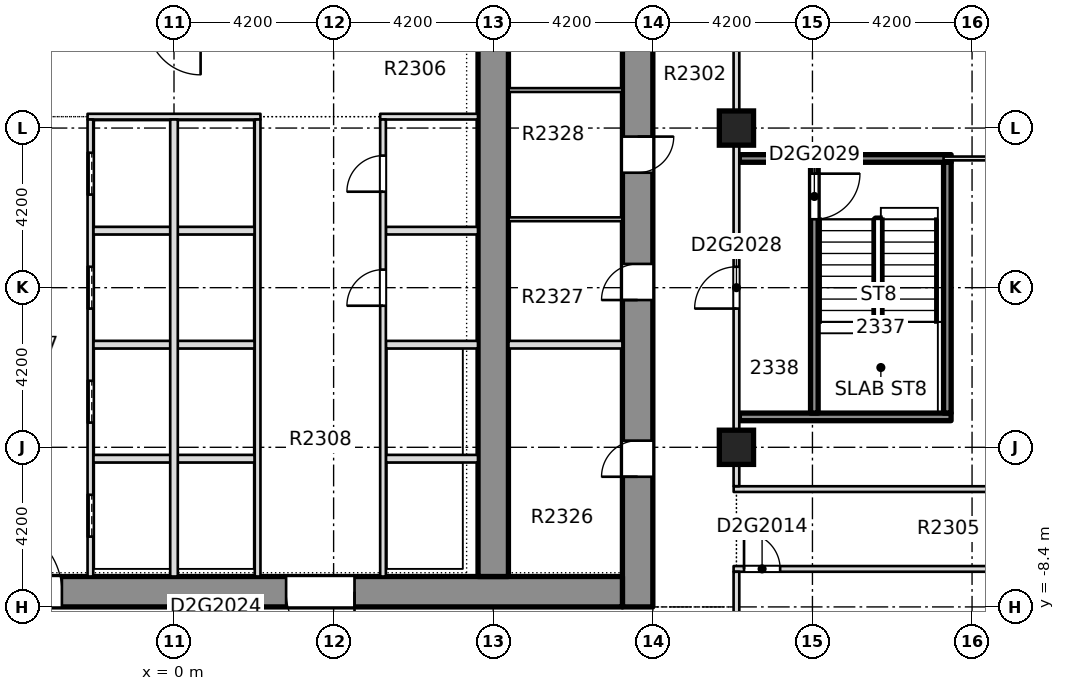
"""IFC4 building model, lengths in metres.
Left out: names, types, materials, properties, quantities, classifications, styles, units other than length and angle.
Written with IfcOpenShell. Run it as: python <this file> out.ifc"""

import sys

from ifc_helpers import new_model, si_unit, direction, frame, frame_2d, origin, origin_2d, place, context, subcontext, project, spatial, rectangle, extrude, element, fill, save


model = new_model("IFC4")
c1 = context("Model", 3, precision=1e-05, world=origin(), true_north=direction((0.0, 1.0)))
c2 = subcontext(c1, "Body", "Model", "MODEL_VIEW")
j1 = project(units=[si_unit("LENGTHUNIT", "METRE"), si_unit("PLANEANGLEUNIT", "RADIAN")], contexts=[c1])
p1 = place(None, origin())
s1 = spatial("IfcSite", under=j1, at=p1, CompositionType="ELEMENT")
p2 = place(p1, origin())
s2 = spatial("IfcBuilding", under=s1, at=p2, CompositionType="ELEMENT")
p3 = place(p2, frame((0.0, 0.0, 94.2)))
s3 = spatial("IfcBuildingStorey", under=s2, at=p3, CompositionType="ELEMENT", Elevation=94.2)
p4 = place(p3, frame((12.2, -8.4, -0.32), z_axis=(0.0, 0.0, 1.0), x_axis=(0.0, 1.0, 0.0)))
e1 = element("IfcWall", 1, at=p4, inside=s3, PredefinedType="SHEAR", context=c2, shape_type="SweptSolid", body=[
    extrude(rectangle(XDim=30.15, YDim=0.8, at=frame_2d((15.075, 0.0))), origin(), (0.0, 0.0, 1.0), 3.45),
])
p5 = place(p4, frame((3.425, 0.0, 0.32)))
e2 = element("IfcOpeningElement", 2, at=p5, cuts=e1, PredefinedType="OPENING", context=c2, shape_type="SweptSolid", body=[
    extrude(rectangle(XDim=0.95, YDim=2.1, at=frame_2d((0.475, 1.05))), frame((0.0, 0.41, 0.0), z_axis=(0.0, -1.0, 0.0), x_axis=(1.0, 0.0, 0.0)), (0.0, 0.0, 1.0), 0.82),
])
p6 = place(p4, frame((8.075, 0.0, 0.32)))
e3 = element("IfcOpeningElement", 3, at=p6, cuts=e1, PredefinedType="OPENING", context=c2, shape_type="SweptSolid", body=[
    extrude(rectangle(XDim=0.95, YDim=2.1, at=frame_2d((0.475, 1.05))), frame((0.0, 0.41, 0.0), z_axis=(0.0, -1.0, 0.0), x_axis=(1.0, 0.0, 0.0)), (0.0, 0.0, 1.0), 0.82),
])
p7 = place(p4, frame((11.425, 0.0, 0.32)))
e4 = element("IfcOpeningElement", 4, at=p7, cuts=e1, PredefinedType="OPENING", context=c2, shape_type="SweptSolid", body=[
    extrude(rectangle(XDim=0.95, YDim=2.1, at=frame_2d((0.475, 1.05))), frame((0.0, 0.41, 0.0), z_axis=(0.0, -1.0, 0.0), x_axis=(1.0, 0.0, 0.0)), (0.0, 0.0, 1.0), 0.82),
])
p8 = place(p4, frame((15.625, 0.0, 0.32)))
e5 = element("IfcOpeningElement", 5, at=p8, cuts=e1, PredefinedType="OPENING", context=c2, shape_type="SweptSolid", body=[
    extrude(rectangle(XDim=0.95, YDim=2.1, at=frame_2d((0.475, 1.05))), frame((0.0, 0.41, 0.0), z_axis=(0.0, -1.0, 0.0), x_axis=(1.0, 0.0, 0.0)), (0.0, 0.0, 1.0), 0.82),
])
p9 = place(p4, frame((22.725, 0.0, 0.32)))
e6 = element("IfcOpeningElement", 6, at=p9, cuts=e1, PredefinedType="OPENING", context=c2, shape_type="SweptSolid", body=[
    extrude(rectangle(XDim=0.95, YDim=2.1, at=frame_2d((0.475, 1.05))), frame((0.0, 0.41, 0.0), z_axis=(0.0, -1.0, 0.0), x_axis=(1.0, 0.0, 0.0)), (0.0, 0.0, 1.0), 0.82),
])
p10 = place(p4, frame((26.75, 0.0, 0.32)))
e7 = element("IfcOpeningElement", 7, at=p10, cuts=e1, PredefinedType="OPENING", context=c2, shape_type="SweptSolid", body=[
    extrude(rectangle(XDim=0.95, YDim=2.1, at=frame_2d((0.475, 1.05))), frame((0.0, 0.41, 0.0), z_axis=(0.0, -1.0, 0.0), x_axis=(1.0, 0.0, 0.0)), (0.0, 0.0, 1.0), 0.82),
])
p11 = place(p4, frame((19.3, 0.0, 0.32)))
e8 = element("IfcOpeningElement", 8, at=p11, cuts=e1, PredefinedType="OPENING", context=c2, shape_type="SweptSolid", body=[
    extrude(rectangle(XDim=1.2, YDim=2.1, at=frame_2d((0.6, 1.05))), frame((0.0, 0.41, 0.0), z_axis=(0.0, -1.0, 0.0), x_axis=(1.0, 0.0, 0.0)), (0.0, 0.0, 1.0), 0.82),
])
p12 = place(p3, frame((-11.8, -8.0, -0.32), z_axis=(0.0, 0.0, 1.0), x_axis=(1.0, 0.0, 0.0)))
e9 = element("IfcWall", 9, at=p12, inside=s3, PredefinedType="SHEAR", context=c2, shape_type="SweptSolid", body=[
    extrude(rectangle(XDim=23.6, YDim=0.8, at=frame_2d((11.8, 0.0))), origin(), (0.0, 0.0, 1.0), 3.45),
])
p13 = place(p12, frame((7.05, 0.0, 0.32)))
e10 = element("IfcOpeningElement", 10, at=p13, cuts=e9, PredefinedType="OPENING", context=c2, shape_type="SweptSolid", body=[
    extrude(rectangle(XDim=1.8, YDim=2.1, at=frame_2d((0.9, 1.05))), frame((0.0, 0.41, 0.0), z_axis=(0.0, -1.0, 0.0), x_axis=(1.0, 0.0, 0.0)), (0.0, 0.0, 1.0), 0.82),
])
p14 = place(p12, frame((14.75, 0.0, 0.32)))
e11 = element("IfcOpeningElement", 11, at=p14, cuts=e9, PredefinedType="OPENING", context=c2, shape_type="SweptSolid", body=[
    extrude(rectangle(XDim=1.8, YDim=2.1, at=frame_2d((0.9, 1.05))), frame((0.0, 0.41, 0.0), z_axis=(0.0, -1.0, 0.0), x_axis=(1.0, 0.0, 0.0)), (0.0, 0.0, 1.0), 0.82),
])
p15 = place(p3, frame((8.4, -7.6, -0.32), z_axis=(0.0, 0.0, 1.0), x_axis=(0.0, 1.0, 0.0)))
e12 = element("IfcWall", 12, at=p15, inside=s3, PredefinedType="SHEAR", context=c2, shape_type="SweptSolid", body=[
    extrude(rectangle(XDim=28.55, YDim=0.8, at=frame_2d((14.275, 0.0))), origin(), (0.0, 0.0, 1.0), 3.45),
])
p16 = place(p15, frame((18.5, 0.0, 0.32)))
e13 = element("IfcOpeningElement", 13, at=p16, cuts=e12, PredefinedType="OPENING", context=c2, shape_type="SweptSolid", body=[
    extrude(rectangle(XDim=1.2, YDim=2.1, at=frame_2d((0.6, 1.05))), frame((0.0, 0.41, 0.0), z_axis=(0.0, -1.0, 0.0), x_axis=(1.0, 0.0, 0.0)), (0.0, 0.0, 1.0), 0.82),
])
for number, where, z_axis, x_axis in (
    (14, (14.8, -4.2, -0.32), (0.0, 0.0, 1.0), (1.0, 0.0, 0.0)),
    (15, (14.8, 4.2, -0.32), (0.0, 0.0, 1.0), (1.0, 0.0, 0.0)),
):
    element("IfcColumn", number, at=place(p3, frame(where, z_axis=z_axis, x_axis=x_axis)), inside=s3, PredefinedType="COLUMN", context=c2, shape_type="SweptSolid", body=[
        extrude(rectangle(XDim=0.9, YDim=0.9, at=origin_2d()), origin(), (0.0, 0.0, 1.0), 3.45),
    ])
p17 = place(p3, frame((14.725, -7.4, 0.0), z_axis=(0.0, 0.0, 1.0), x_axis=(1.0, 0.0, 0.0)))
e16 = element("IfcWall", 16, at=p17, inside=s3, PredefinedType="PARTITIONING", context=c2, shape_type="SweptSolid", body=[
    extrude(rectangle(XDim=11.025, YDim=0.15, at=frame_2d((5.512, 0.0))), origin(), (0.0, 0.0, 1.0), 3.13),
])
p18 = place(p17, frame((0.275, 0.0, 0.0)))
e17 = element("IfcOpeningElement", 17, at=p18, cuts=e16, PredefinedType="OPENING", context=c2, shape_type="SweptSolid", body=[
    extrude(rectangle(XDim=0.95, YDim=2.1, at=frame_2d((0.475, 1.05))), frame((0.0, 0.085, 0.0), z_axis=(0.0, -1.0, 0.0), x_axis=(1.0, 0.0, 0.0)), (0.0, 0.0, 1.0), 0.17),
])
p19 = place(p3, frame((14.727, -5.3, 0.0), z_axis=(0.0, 0.0, 1.0), x_axis=(1.0, 0.0, 0.0)))
e18 = element("IfcWall", 18, at=p19, inside=s3, PredefinedType="PARTITIONING", context=c2, shape_type="SweptSolid", body=[
    extrude(rectangle(XDim=11.023, YDim=0.15, at=frame_2d((5.511, 0.0))), origin(), (0.0, 0.0, 1.0), 3.13),
])
p20 = place(p3, frame((14.877, -3.4, 0.0), z_axis=(0.0, 0.0, 1.0), x_axis=(1.0, 0.0, 0.0)))
e19 = element("IfcWall", 19, at=p20, inside=s3, PredefinedType="SOLIDWALL", context=c2, shape_type="SweptSolid", body=[
    extrude(rectangle(XDim=5.571, YDim=0.2, at=frame_2d((2.786, 0.0))), origin(), (0.0, 0.0, 1.0), 3.13),
])
p21 = place(p3, frame((14.875, 3.4, 0.0), z_axis=(0.0, 0.0, 1.0), x_axis=(1.0, 0.0, 0.0)))
e20 = element("IfcWall", 20, at=p21, inside=s3, PredefinedType="SOLIDWALL", context=c2, shape_type="SweptSolid", body=[
    extrude(rectangle(XDim=5.575, YDim=0.2, at=frame_2d((2.788, 0.0))), origin(), (0.0, 0.0, 1.0), 3.13),
])
p22 = place(p3, frame((20.25, 3.4, 0.0), z_axis=(0.0, 0.0, 1.0), x_axis=(1.0, 0.0, 0.0)))
e21 = element("IfcWall", 21, at=p22, inside=s3, PredefinedType="PARTITIONING", context=c2, shape_type="SweptSolid", body=[
    extrude(rectangle(XDim=5.5, YDim=0.1, at=frame_2d((2.75, 0.0))), origin(), (0.0, 0.0, 1.0), 3.13),
])
p23 = place(p22, frame((2.425, 0.0, 0.0)))
e22 = element("IfcOpeningElement", 22, at=p23, cuts=e21, PredefinedType="OPENING", context=c2, shape_type="SweptSolid", body=[
    extrude(rectangle(XDim=0.95, YDim=2.1, at=frame_2d((0.475, 1.05))), frame((0.0, 0.06, 0.0), z_axis=(0.0, -1.0, 0.0), x_axis=(1.0, 0.0, 0.0)), (0.0, 0.0, 1.0), 0.12),
])
p24 = place(p3, frame((14.8, -10.6, 0.0), z_axis=(0.0, 0.0, 1.0), x_axis=(0.0, 1.0, 0.0)))
e23 = element("IfcWall", 23, at=p24, inside=s3, PredefinedType="PARTITIONING", context=c2, shape_type="SweptSolid", body=[
    extrude(rectangle(XDim=3.125, YDim=0.15, at=frame_2d((1.562, 0.0))), origin(), (0.0, 0.0, 1.0), 3.13),
])
p25 = place(p3, frame((14.8, -5.223, 0.0), z_axis=(0.0, 0.0, 1.0), x_axis=(0.0, 1.0, 0.0)))
e24 = element("IfcWall", 24, at=p25, inside=s3, PredefinedType="PARTITIONING", context=c2, shape_type="SweptSolid", body=[
    extrude(rectangle(XDim=19.873, YDim=0.15, at=frame_2d((9.937, 0.0))), origin(), (0.0, 0.0, 1.0), 3.13),
])
p26 = place(p25, frame((12.723, 0.0, 0.0)))
e25 = element("IfcOpeningElement", 25, at=p26, cuts=e24, PredefinedType="OPENING", context=c2, shape_type="SweptSolid", body=[
    extrude(rectangle(XDim=1.0, YDim=2.1, at=frame_2d((0.5, 1.05))), frame((0.0, 0.085, 0.0), z_axis=(0.0, -1.0, 0.0), x_axis=(1.0, 0.0, 0.0)), (0.0, 0.0, 1.0), 0.17),
])
p27 = place(p25, frame((4.673, 0.0, 0.0)))
e26 = element("IfcOpeningElement", 26, at=p27, cuts=e24, PredefinedType="OPENING", context=c2, shape_type="SweptSolid", body=[
    extrude(rectangle(XDim=1.1, YDim=2.1, at=frame_2d((0.55, 1.05))), frame((0.0, 0.085, 0.0), z_axis=(0.0, -1.0, 0.0), x_axis=(1.0, 0.0, 0.0)), (0.0, 0.0, 1.0), 0.17),
])
p28 = place(p3, frame((16.85, -3.3, 0.0), z_axis=(0.0, 0.0, 1.0), x_axis=(0.0, 1.0, 0.0)))
e27 = element("IfcWall", 27, at=p28, inside=s3, PredefinedType="SOLIDWALL", context=c2, shape_type="SweptSolid", body=[
    extrude(rectangle(XDim=6.6, YDim=0.2, at=frame_2d((3.3, 0.0))), origin(), (0.0, 0.0, 1.0), 3.13),
])
p29 = place(p28, frame((5.1, 0.0, 0.0)))
e28 = element("IfcOpeningElement", 28, at=p29, cuts=e27, PredefinedType="OPENING", context=c2, shape_type="SweptSolid", body=[
    extrude(rectangle(XDim=1.2, YDim=2.1, at=frame_2d((0.6, 1.05))), frame((0.0, 0.11, 0.0), z_axis=(0.0, -1.0, 0.0), x_axis=(1.0, 0.0, 0.0)), (0.0, 0.0, 1.0), 0.22),
])
p30 = place(p3, frame((-2.125, -4.5, 0.0), z_axis=(0.0, 0.0, 1.0), x_axis=(1.0, 0.0, 0.0)))
e29 = element("IfcWall", 29, at=p30, inside=s3, PredefinedType="PARTITIONING", context=c2, shape_type="SweptSolid", body=[
    extrude(rectangle(XDim=4.25, YDim=0.2, at=frame_2d((2.125, 0.0))), origin(), (0.0, 0.0, 1.0), 3.13),
])
p31 = place(p3, frame((5.575, -4.5, 0.0), z_axis=(0.0, 0.0, 1.0), x_axis=(1.0, 0.0, 0.0)))
e30 = element("IfcWall", 30, at=p31, inside=s3, PredefinedType="PARTITIONING", context=c2, shape_type="SweptSolid", body=[
    extrude(rectangle(XDim=2.424, YDim=0.2, at=frame_2d((1.212, 0.0))), origin(), (0.0, 0.0, 1.0), 3.13),
])
p32 = place(p3, frame((-2.125, -1.5, 0.0), z_axis=(0.0, 0.0, 1.0), x_axis=(1.0, 0.0, 0.0)))
e31 = element("IfcWall", 31, at=p32, inside=s3, PredefinedType="PARTITIONING", context=c2, shape_type="SweptSolid", body=[
    extrude(rectangle(XDim=4.25, YDim=0.2, at=frame_2d((2.125, 0.0))), origin(), (0.0, 0.0, 1.0), 3.13),
])
p33 = place(p3, frame((5.575, -1.5, 0.0), z_axis=(0.0, 0.0, 1.0), x_axis=(1.0, 0.0, 0.0)))
e32 = element("IfcWall", 32, at=p33, inside=s3, PredefinedType="PARTITIONING", context=c2, shape_type="SweptSolid", body=[
    extrude(rectangle(XDim=2.424, YDim=0.2, at=frame_2d((1.212, 0.0))), origin(), (0.0, 0.0, 1.0), 3.13),
])
p34 = place(p3, frame((-2.125, 1.5, 0.0), z_axis=(0.0, 0.0, 1.0), x_axis=(1.0, 0.0, 0.0)))
e33 = element("IfcWall", 33, at=p34, inside=s3, PredefinedType="PARTITIONING", context=c2, shape_type="SweptSolid", body=[
    extrude(rectangle(XDim=4.25, YDim=0.2, at=frame_2d((2.125, 0.0))), origin(), (0.0, 0.0, 1.0), 3.13),
])
p35 = place(p3, frame((5.575, 1.5, 0.0), z_axis=(0.0, 0.0, 1.0), x_axis=(1.0, 0.0, 0.0)))
e34 = element("IfcWall", 34, at=p35, inside=s3, PredefinedType="PARTITIONING", context=c2, shape_type="SweptSolid", body=[
    extrude(rectangle(XDim=2.424, YDim=0.2, at=frame_2d((1.212, 0.0))), origin(), (0.0, 0.0, 1.0), 3.13),
])
p36 = place(p3, frame((-2.275, 4.5, 0.0), z_axis=(0.0, 0.0, 1.0), x_axis=(1.0, 0.0, 0.0)))
e35 = element("IfcWall", 35, at=p36, inside=s3, PredefinedType="PARTITIONING", context=c2, shape_type="SweptSolid", body=[
    extrude(rectangle(XDim=4.55, YDim=0.15, at=frame_2d((2.275, 0.0))), origin(), (0.0, 0.0, 1.0), 3.13),
])
p37 = place(p3, frame((5.425, 4.5, 0.0), z_axis=(0.0, 0.0, 1.0), x_axis=(1.0, 0.0, 0.0)))
e36 = element("IfcWall", 36, at=p37, inside=s3, PredefinedType="PARTITIONING", context=c2, shape_type="SweptSolid", body=[
    extrude(rectangle(XDim=2.574, YDim=0.15, at=frame_2d((1.287, 0.0))), origin(), (0.0, 0.0, 1.0), 3.13),
])
p38 = place(p3, frame((-2.2, -7.599, 0.0), z_axis=(0.0, 0.0, 1.0), x_axis=(0.0, 1.0, 0.0)))
e37 = element("IfcWall", 37, at=p38, inside=s3, PredefinedType="PARTITIONING", context=c2, shape_type="SweptSolid", body=[
    extrude(rectangle(XDim=12.024, YDim=0.15, at=frame_2d((6.012, 0.0))), origin(), (0.0, 0.0, 1.0), 3.13),
])
p39 = place(p38, frame((1.049, 0.0, 0.0)))
e38 = element("IfcOpeningElement", 38, at=p39, cuts=e37, PredefinedType="OPENING", context=c2, shape_type="SweptSolid", body=[
    extrude(rectangle(XDim=1.1, YDim=2.1, at=frame_2d((0.55, 1.05))), frame((0.0, 0.085, 0.0), z_axis=(0.0, -1.0, 0.0), x_axis=(1.0, 0.0, 0.0)), (0.0, 0.0, 1.0), 0.17),
])
p40 = place(p38, frame((4.049, 0.0, 0.0)))
e39 = element("IfcOpeningElement", 39, at=p40, cuts=e37, PredefinedType="OPENING", context=c2, shape_type="SweptSolid", body=[
    extrude(rectangle(XDim=1.1, YDim=2.1, at=frame_2d((0.55, 1.05))), frame((0.0, 0.085, 0.0), z_axis=(0.0, -1.0, 0.0), x_axis=(1.0, 0.0, 0.0)), (0.0, 0.0, 1.0), 0.17),
])
p41 = place(p38, frame((7.049, 0.0, 0.0)))
e40 = element("IfcOpeningElement", 40, at=p41, cuts=e37, PredefinedType="OPENING", context=c2, shape_type="SweptSolid", body=[
    extrude(rectangle(XDim=1.1, YDim=2.1, at=frame_2d((0.55, 1.05))), frame((0.0, 0.085, 0.0), z_axis=(0.0, -1.0, 0.0), x_axis=(1.0, 0.0, 0.0)), (0.0, 0.0, 1.0), 0.17),
])
p42 = place(p38, frame((10.049, 0.0, 0.0)))
e41 = element("IfcOpeningElement", 41, at=p42, cuts=e37, PredefinedType="OPENING", context=c2, shape_type="SweptSolid", body=[
    extrude(rectangle(XDim=1.1, YDim=2.1, at=frame_2d((0.55, 1.05))), frame((0.0, 0.085, 0.0), z_axis=(0.0, -1.0, 0.0), x_axis=(1.0, 0.0, 0.0)), (0.0, 0.0, 1.0), 0.17),
])
p43 = place(p3, frame((0.0, -7.599, 0.0), z_axis=(0.0, 0.0, 1.0), x_axis=(0.0, 1.0, 0.0)))
e42 = element("IfcWall", 42, at=p43, inside=s3, PredefinedType="PARTITIONING", context=c2, shape_type="SweptSolid", body=[
    extrude(rectangle(XDim=12.024, YDim=0.2, at=frame_2d((6.012, 0.0))), origin(), (0.0, 0.0, 1.0), 3.13),
])
p44 = place(p3, frame((2.2, -7.599, 0.0), z_axis=(0.0, 0.0, 1.0), x_axis=(0.0, 1.0, 0.0)))
e43 = element("IfcWall", 43, at=p44, inside=s3, PredefinedType="PARTITIONING", context=c2, shape_type="SweptSolid", body=[
    extrude(rectangle(XDim=12.024, YDim=0.15, at=frame_2d((6.012, 0.0))), origin(), (0.0, 0.0, 1.0), 3.13),
])
p45 = place(p3, frame((5.5, -7.599, 0.0), z_axis=(0.0, 0.0, 1.0), x_axis=(0.0, 1.0, 0.0)))
e44 = element("IfcWall", 44, at=p45, inside=s3, PredefinedType="PARTITIONING", context=c2, shape_type="SweptSolid", body=[
    extrude(rectangle(XDim=12.024, YDim=0.15, at=frame_2d((6.012, 0.0))), origin(), (0.0, 0.0, 1.0), 3.13),
])
p46 = place(p45, frame((7.124, 0.0, 0.0)))
e45 = element("IfcOpeningElement", 45, at=p46, cuts=e44, PredefinedType="OPENING", context=c2, shape_type="SweptSolid", body=[
    extrude(rectangle(XDim=0.95, YDim=2.1, at=frame_2d((0.475, 1.05))), frame((0.0, 0.085, 0.0), z_axis=(0.0, -1.0, 0.0), x_axis=(1.0, 0.0, 0.0)), (0.0, 0.0, 1.0), 0.17),
])
p47 = place(p45, frame((10.124, 0.0, 0.0)))
e46 = element("IfcOpeningElement", 46, at=p47, cuts=e44, PredefinedType="OPENING", context=c2, shape_type="SweptSolid", body=[
    extrude(rectangle(XDim=0.95, YDim=2.1, at=frame_2d((0.475, 1.05))), frame((0.0, 0.085, 0.0), z_axis=(0.0, -1.0, 0.0), x_axis=(1.0, 0.0, 0.0)), (0.0, 0.0, 1.0), 0.17),
])
p48 = place(p3, frame((8.801, -1.5, 0.0), z_axis=(0.0, 0.0, 1.0), x_axis=(1.0, 0.0, 0.0)))
e47 = element("IfcWall", 47, at=p48, inside=s3, PredefinedType="PARTITIONING", context=c2, shape_type="SweptSolid", body=[
    extrude(rectangle(XDim=2.998, YDim=0.2, at=frame_2d((1.499, 0.0))), origin(), (0.0, 0.0, 1.0), 3.13),
])
for number, where, z_axis, x_axis in (
    (48, (8.801, 1.8, 0.0), (0.0, 0.0, 1.0), (1.0, 0.0, 0.0)),
    (49, (8.801, 5.2, 0.0), (0.0, 0.0, 1.0), (1.0, 0.0, 0.0)),
):
    element("IfcWall", number, at=place(p3, frame(where, z_axis=z_axis, x_axis=x_axis)), inside=s3, PredefinedType="PARTITIONING", context=c2, shape_type="SweptSolid", body=[
        extrude(rectangle(XDim=2.998, YDim=0.1, at=frame_2d((1.499, 0.0))), origin(), (0.0, 0.0, 1.0), 3.13),
    ])
p49 = place(p3, frame((20.35, -3.298, 0.0), z_axis=(0.0, 0.0, 1.0), x_axis=(0.0, 1.0, 0.0)))
e50 = element("IfcWall", 50, at=p49, inside=s3, PredefinedType="SOLIDWALL", context=c2, shape_type="SweptSolid", body=[
    extrude(rectangle(XDim=6.598, YDim=0.2, at=frame_2d((3.299, 0.0))), origin(), (0.0, 0.0, 1.0), 3.13),
])
p50 = place(p18, origin())
e51 = element("IfcDoor", 51, at=p50, inside=s3, OperationType="SINGLE_SWING_RIGHT", PredefinedType="DOOR", context=c2, shape_type="SweptSolid", body=[
    extrude(rectangle(XDim=0.95, YDim=2.1, at=frame_2d((0.475, 1.05))), frame((0.0, 0.025, 0.0), z_axis=(0.0, -1.0, 0.0), x_axis=(1.0, 0.0, 0.0)), (0.0, 0.0, 1.0), 0.05),
])
fill(e17, e51)
p51 = place(p27, origin())
e52 = element("IfcDoor", 52, at=p51, inside=s3, OperationType="SINGLE_SWING_RIGHT", PredefinedType="DOOR", context=c2, shape_type="SweptSolid", body=[
    extrude(rectangle(XDim=1.1, YDim=2.1, at=frame_2d((0.55, 1.05))), frame((0.0, 0.025, 0.0), z_axis=(0.0, -1.0, 0.0), x_axis=(1.0, 0.0, 0.0)), (0.0, 0.0, 1.0), 0.05),
])
fill(e26, e52)
p52 = place(p29, origin())
e53 = element("IfcDoor", 53, at=p52, inside=s3, OperationType="SINGLE_SWING_LEFT", PredefinedType="DOOR", context=c2, shape_type="SweptSolid", body=[
    extrude(rectangle(XDim=1.2, YDim=2.1, at=frame_2d((0.6, 1.05))), frame((0.0, 0.025, 0.0), z_axis=(0.0, -1.0, 0.0), x_axis=(1.0, 0.0, 0.0)), (0.0, 0.0, 1.0), 0.05),
])
fill(e28, e53)
p53 = place(p39, origin())
e54 = element("IfcDoor", 54, at=p53, inside=s3, OperationType="SLIDING_TO_LEFT", PredefinedType="DOOR", context=c2, shape_type="SweptSolid", body=[
    extrude(rectangle(XDim=1.1, YDim=2.1, at=frame_2d((0.55, 1.05))), frame((0.0, 0.025, 0.0), z_axis=(0.0, -1.0, 0.0), x_axis=(1.0, 0.0, 0.0)), (0.0, 0.0, 1.0), 0.05),
])
fill(e38, e54)
p54 = place(p40, origin())
e55 = element("IfcDoor", 55, at=p54, inside=s3, OperationType="SLIDING_TO_LEFT", PredefinedType="DOOR", context=c2, shape_type="SweptSolid", body=[
    extrude(rectangle(XDim=1.1, YDim=2.1, at=frame_2d((0.55, 1.05))), frame((0.0, 0.025, 0.0), z_axis=(0.0, -1.0, 0.0), x_axis=(1.0, 0.0, 0.0)), (0.0, 0.0, 1.0), 0.05),
])
fill(e39, e55)
p55 = place(p41, origin())
e56 = element("IfcDoor", 56, at=p55, inside=s3, OperationType="SLIDING_TO_LEFT", PredefinedType="DOOR", context=c2, shape_type="SweptSolid", body=[
    extrude(rectangle(XDim=1.1, YDim=2.1, at=frame_2d((0.55, 1.05))), frame((0.0, 0.025, 0.0), z_axis=(0.0, -1.0, 0.0), x_axis=(1.0, 0.0, 0.0)), (0.0, 0.0, 1.0), 0.05),
])
fill(e40, e56)
p56 = place(p42, origin())
e57 = element("IfcDoor", 57, at=p56, inside=s3, OperationType="SLIDING_TO_LEFT", PredefinedType="DOOR", context=c2, shape_type="SweptSolid", body=[
    extrude(rectangle(XDim=1.1, YDim=2.1, at=frame_2d((0.55, 1.05))), frame((0.0, 0.025, 0.0), z_axis=(0.0, -1.0, 0.0), x_axis=(1.0, 0.0, 0.0)), (0.0, 0.0, 1.0), 0.05),
])
fill(e41, e57)
p57 = place(p46, origin())
e58 = element("IfcDoor", 58, at=p57, inside=s3, OperationType="SINGLE_SWING_RIGHT", PredefinedType="DOOR", context=c2, shape_type="SweptSolid", body=[
    extrude(rectangle(XDim=0.95, YDim=2.1, at=frame_2d((0.475, 1.05))), frame((0.0, 0.025, 0.0), z_axis=(0.0, -1.0, 0.0), x_axis=(1.0, 0.0, 0.0)), (0.0, 0.0, 1.0), 0.05),
])
fill(e45, e58)
p58 = place(p47, origin())
e59 = element("IfcDoor", 59, at=p58, inside=s3, OperationType="SINGLE_SWING_RIGHT", PredefinedType="DOOR", context=c2, shape_type="SweptSolid", body=[
    extrude(rectangle(XDim=0.95, YDim=2.1, at=frame_2d((0.475, 1.05))), frame((0.0, 0.025, 0.0), z_axis=(0.0, -1.0, 0.0), x_axis=(1.0, 0.0, 0.0)), (0.0, 0.0, 1.0), 0.05),
])
fill(e46, e59)
p59 = place(p13, origin())
e60 = element("IfcDoor", 60, at=p59, inside=s3, OperationType="SINGLE_SWING_LEFT", PredefinedType="DOOR", context=c2, shape_type="SweptSolid", body=[
    extrude(rectangle(XDim=1.8, YDim=2.1, at=frame_2d((0.9, 1.05))), frame((0.0, 0.025, 0.0), z_axis=(0.0, -1.0, 0.0), x_axis=(1.0, 0.0, 0.0)), (0.0, 0.0, 1.0), 0.05),
])
fill(e10, e60)
p60 = place(p14, origin())
e61 = element("IfcDoor", 61, at=p60, inside=s3, OperationType="SINGLE_SWING_LEFT", PredefinedType="DOOR", context=c2, shape_type="SweptSolid", body=[
    extrude(rectangle(XDim=1.8, YDim=2.1, at=frame_2d((0.9, 1.05))), frame((0.0, 0.025, 0.0), z_axis=(0.0, -1.0, 0.0), x_axis=(1.0, 0.0, 0.0)), (0.0, 0.0, 1.0), 0.05),
])
fill(e11, e61)
p61 = place(p5, origin())
e62 = element("IfcDoor", 62, at=p61, inside=s3, OperationType="SINGLE_SWING_LEFT", PredefinedType="DOOR", context=c2, shape_type="SweptSolid", body=[
    extrude(rectangle(XDim=0.95, YDim=2.1, at=frame_2d((0.475, 1.05))), frame((0.0, 0.025, 0.0), z_axis=(0.0, -1.0, 0.0), x_axis=(1.0, 0.0, 0.0)), (0.0, 0.0, 1.0), 0.05),
])
fill(e2, e62)
p62 = place(p6, origin())
e63 = element("IfcDoor", 63, at=p62, inside=s3, OperationType="SINGLE_SWING_LEFT", PredefinedType="DOOR", context=c2, shape_type="SweptSolid", body=[
    extrude(rectangle(XDim=0.95, YDim=2.1, at=frame_2d((0.475, 1.05))), frame((0.0, 0.025, 0.0), z_axis=(0.0, -1.0, 0.0), x_axis=(1.0, 0.0, 0.0)), (0.0, 0.0, 1.0), 0.05),
])
fill(e3, e63)
p63 = place(p7, origin())
e64 = element("IfcDoor", 64, at=p63, inside=s3, OperationType="SINGLE_SWING_LEFT", PredefinedType="DOOR", context=c2, shape_type="SweptSolid", body=[
    extrude(rectangle(XDim=0.95, YDim=2.1, at=frame_2d((0.475, 1.05))), frame((0.0, 0.025, 0.0), z_axis=(0.0, -1.0, 0.0), x_axis=(1.0, 0.0, 0.0)), (0.0, 0.0, 1.0), 0.05),
])
fill(e4, e64)
save(model, sys.argv[1])
